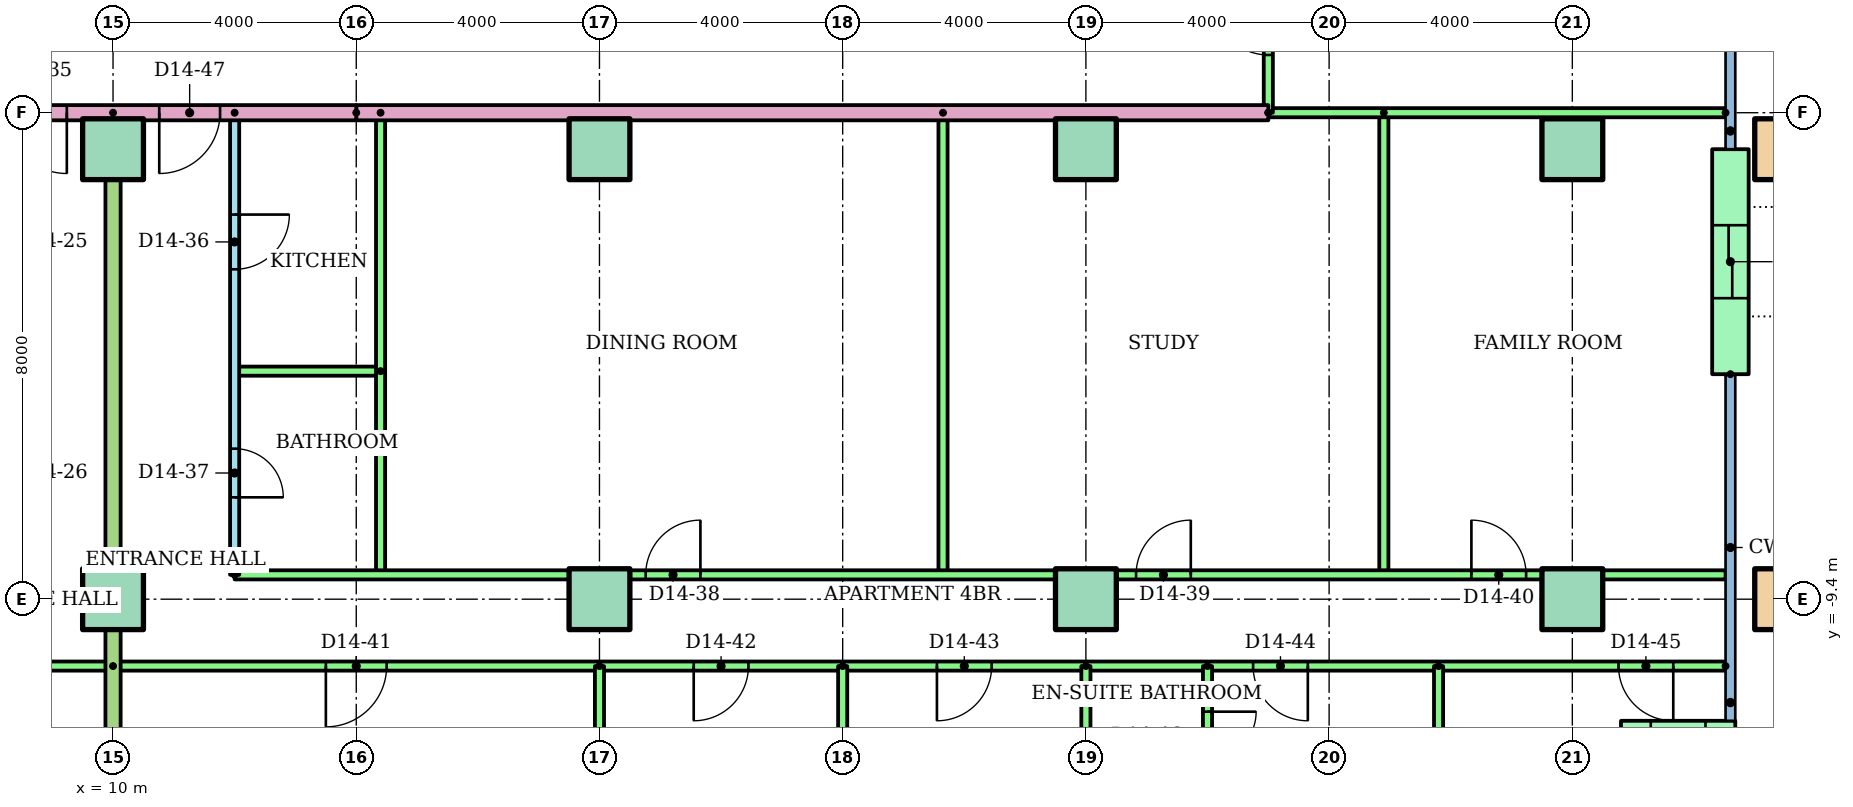
"""IFC4 building model, lengths in metres.
Left out: names, types, materials, properties, quantities, classifications, styles, units other than length and angle.
Written with IfcOpenShell. Run it as: python <this file> out.ifc"""

import sys

from ifc_helpers import new_model, si_unit, direction, frame, frame_2d, origin, origin_2d, place, context, subcontext, project, spatial, rectangle, hollow_rectangle, extrude, element, fill, save


model = new_model("IFC4")
c1 = context("Model", 3, precision=1e-05, world=origin(), true_north=direction((0.0, 1.0)))
c2 = subcontext(c1, "Body", "Model", "MODEL_VIEW")
j1 = project(units=[si_unit("LENGTHUNIT", "METRE"), si_unit("PLANEANGLEUNIT", "RADIAN")], contexts=[c1])
p1 = place(None, origin())
s1 = spatial("IfcSite", under=j1, at=p1, CompositionType="ELEMENT")
p2 = place(p1, origin())
s2 = spatial("IfcBuilding", under=s1, at=p2, CompositionType="ELEMENT")
p3 = place(p2, frame((0.0, 0.0, 54.4)))
s3 = spatial("IfcBuildingStorey", under=s2, at=p3, CompositionType="ELEMENT", Elevation=54.4)
for number, where in (
    (1, (10.0, -9.4, 0.0)),
    (2, (18.0, -9.4, 0.0)),
    (3, (26.0, -9.4, 0.0)),
    (4, (34.0, -9.4, 0.0)),
):
    element("IfcColumn", number, at=place(p3, frame(where)), inside=s3, PredefinedType="COLUMN", context=c2, shape_type="SweptSolid", body=[
        extrude(rectangle(XDim=1.0, YDim=1.0, at=origin_2d()), origin(), (0.0, 0.0, 1.0), 3.2),
    ])
p4 = place(p3, frame((37.5, -9.4, 0.0)))
e5 = element("IfcColumn", 5, at=p4, inside=s3, PredefinedType="COLUMN", context=c2, shape_type="SweptSolid", body=[
    extrude(hollow_rectangle(XDim=1.0, YDim=1.0, WallThickness=0.05, at=origin_2d()), origin(), (0.0, 0.0, 1.0), 3.2),
])
for number, where in (
    (6, (10.0, -2.0, 0.0)),
    (7, (18.0, -2.0, 0.0)),
    (8, (26.0, -2.0, 0.0)),
    (9, (34.0, -2.0, 0.0)),
):
    element("IfcColumn", number, at=place(p3, frame(where)), inside=s3, PredefinedType="COLUMN", context=c2, shape_type="SweptSolid", body=[
        extrude(rectangle(XDim=1.0, YDim=1.0, at=origin_2d()), origin(), (0.0, 0.0, 1.0), 3.2),
    ])
p5 = place(p3, frame((37.5, -2.0, 0.0)))
e10 = element("IfcColumn", 10, at=p5, inside=s3, PredefinedType="COLUMN", context=c2, shape_type="SweptSolid", body=[
    extrude(hollow_rectangle(XDim=1.0, YDim=1.0, WallThickness=0.05, at=origin_2d()), origin(), (0.0, 0.0, 1.0), 3.2),
])
p6 = place(p3, frame((34.8, -11.7, 0.0)))
e11 = element("IfcWall", 11, at=p6, inside=s3, PredefinedType="STANDARD", context=c2, shape_type="SweptSolid", body=[
    extrude(rectangle(XDim=1.88, YDim=0.6, at=frame_2d((0.94, 0.0))), origin(), (0.0, 0.0, 1.0), 2.92),
])
p7 = place(p6, frame((0.49, 0.0, 0.9)))
e12 = element("IfcOpeningElement", 12, at=p7, cuts=e11, PredefinedType="OPENING", context=c2, shape_type="SweptSolid", body=[
    extrude(rectangle(XDim=0.9, YDim=1.5, at=frame_2d((0.45, 0.75))), frame((0.0, 0.31, 0.0), z_axis=(0.0, -1.0, 0.0), x_axis=(1.0, 0.0, 0.0)), (0.0, 0.0, 1.0), 0.62),
])
p8 = place(p3, frame((36.6, -5.7, 0.0), z_axis=(0.0, 0.0, 1.0), x_axis=(0.0, 1.0, 0.0)))
e13 = element("IfcWall", 13, at=p8, inside=s3, PredefinedType="STANDARD", context=c2, shape_type="SweptSolid", body=[
    extrude(rectangle(XDim=3.7, YDim=0.6, at=frame_2d((1.85, 0.0))), origin(), (0.0, 0.0, 1.0), 2.92),
])
p9 = place(p8, frame((1.25, 0.0, 0.0)))
e14 = element("IfcOpeningElement", 14, at=p9, cuts=e13, PredefinedType="OPENING", context=c2, shape_type="SweptSolid", body=[
    extrude(rectangle(XDim=1.2, YDim=2.1, at=frame_2d((0.6, 1.05))), frame((0.0, 0.31, 0.0), z_axis=(0.0, -1.0, 0.0), x_axis=(1.0, 0.0, 0.0)), (0.0, 0.0, 1.0), 0.62),
])
p10 = place(p3, frame((10.0, -10.5, 0.0), z_axis=(0.0, 0.0, 1.0), x_axis=(-1.0, 0.0, 0.0)))
e15 = element("IfcWall", 15, at=p10, inside=s3, PredefinedType="PARTITIONING", context=c2, shape_type="SweptSolid", body=[
    extrude(rectangle(XDim=24.0, YDim=0.15, at=frame_2d((12.0, 0.0))), origin(), (0.0, 0.0, 1.0), 2.4),
])
p11 = place(p10, frame((19.5, 0.0, 0.0)))
e16 = element("IfcOpeningElement", 16, at=p11, cuts=e15, PredefinedType="OPENING", context=c2, shape_type="SweptSolid", body=[
    extrude(rectangle(XDim=1.0, YDim=2.1, at=frame_2d((0.5, 1.05))), frame((0.0, 0.085, 0.0), z_axis=(0.0, -1.0, 0.0), x_axis=(1.0, 0.0, 0.0)), (0.0, 0.0, 1.0), 0.17),
])
p12 = place(p10, frame((13.55, 0.0, 0.0)))
e17 = element("IfcOpeningElement", 17, at=p12, cuts=e15, PredefinedType="OPENING", context=c2, shape_type="SweptSolid", body=[
    extrude(rectangle(XDim=0.9, YDim=2.1, at=frame_2d((0.45, 1.05))), frame((0.0, 0.085, 0.0), z_axis=(0.0, -1.0, 0.0), x_axis=(1.0, 0.0, 0.0)), (0.0, 0.0, 1.0), 0.17),
])
p13 = place(p10, frame((9.55, 0.0, 0.0)))
e18 = element("IfcOpeningElement", 18, at=p13, cuts=e15, PredefinedType="OPENING", context=c2, shape_type="SweptSolid", body=[
    extrude(rectangle(XDim=0.9, YDim=2.1, at=frame_2d((0.45, 1.05))), frame((0.0, 0.085, 0.0), z_axis=(0.0, -1.0, 0.0), x_axis=(1.0, 0.0, 0.0)), (0.0, 0.0, 1.0), 0.17),
])
p14 = place(p10, frame((5.55, 0.0, 0.0)))
e19 = element("IfcOpeningElement", 19, at=p14, cuts=e15, PredefinedType="OPENING", context=c2, shape_type="SweptSolid", body=[
    extrude(rectangle(XDim=0.9, YDim=2.1, at=frame_2d((0.45, 1.05))), frame((0.0, 0.085, 0.0), z_axis=(0.0, -1.0, 0.0), x_axis=(1.0, 0.0, 0.0)), (0.0, 0.0, 1.0), 0.17),
])
p15 = place(p10, frame((1.55, 0.0, 0.0)))
e20 = element("IfcOpeningElement", 20, at=p15, cuts=e15, PredefinedType="OPENING", context=c2, shape_type="SweptSolid", body=[
    extrude(rectangle(XDim=0.9, YDim=2.1, at=frame_2d((0.45, 1.05))), frame((0.0, 0.085, 0.0), z_axis=(0.0, -1.0, 0.0), x_axis=(1.0, 0.0, 0.0)), (0.0, 0.0, 1.0), 0.17),
])
p16 = place(p3, frame((12.0, -1.4, 0.0), z_axis=(0.0, 0.0, 1.0), x_axis=(0.0, -1.0, 0.0)))
e21 = element("IfcWall", 21, at=p16, inside=s3, PredefinedType="PARTITIONING", context=c2, shape_type="SweptSolid", body=[
    extrude(rectangle(XDim=7.6, YDim=0.15, at=frame_2d((3.8, 0.0))), origin(), (0.0, 0.0, 1.0), 2.4),
])
p17 = place(p16, frame((1.675, 0.0, 0.0)))
e22 = element("IfcOpeningElement", 22, at=p17, cuts=e21, PredefinedType="OPENING", context=c2, shape_type="SweptSolid", body=[
    extrude(rectangle(XDim=0.9, YDim=2.1, at=frame_2d((0.45, 1.05))), frame((0.0, 0.085, 0.0), z_axis=(0.0, -1.0, 0.0), x_axis=(1.0, 0.0, 0.0)), (0.0, 0.0, 1.0), 0.17),
])
p18 = place(p16, frame((5.525, 0.0, 0.0)))
e23 = element("IfcOpeningElement", 23, at=p18, cuts=e21, PredefinedType="OPENING", context=c2, shape_type="SweptSolid", body=[
    extrude(rectangle(XDim=0.8, YDim=2.1, at=frame_2d((0.4, 1.05))), frame((0.0, 0.085, 0.0), z_axis=(0.0, -1.0, 0.0), x_axis=(1.0, 0.0, 0.0)), (0.0, 0.0, 1.0), 0.17),
])
p19 = place(p3, frame((14.4, -5.65, 0.0), z_axis=(0.0, 0.0, 1.0), x_axis=(-1.0, 0.0, 0.0)))
e24 = element("IfcWall", 24, at=p19, inside=s3, PredefinedType="PARTITIONING", context=c2, shape_type="SweptSolid", body=[
    extrude(rectangle(XDim=2.4, YDim=0.15, at=frame_2d((1.2, 0.0))), origin(), (0.0, 0.0, 1.0), 2.4),
])
for number, where, z_axis, x_axis in (
    (25, (14.4, -1.4, 0.0), (0.0, 0.0, 1.0), (0.0, -1.0, 0.0)),
    (26, (23.65, -1.4, 0.0), (0.0, 0.0, 1.0), (0.0, -1.0, 0.0)),
    (27, (30.9, -1.4, 0.0), (0.0, 0.0, 1.0), (0.0, -1.0, 0.0)),
):
    element("IfcWall", number, at=place(p3, frame(where, z_axis=z_axis, x_axis=x_axis)), inside=s3, PredefinedType="PARTITIONING", context=c2, shape_type="SweptSolid", body=[
        extrude(rectangle(XDim=7.6, YDim=0.15, at=frame_2d((3.8, 0.0))), origin(), (0.0, 0.0, 1.0), 2.4),
    ])
p20 = place(p3, frame((12.0, -9.0, 0.0)))
e28 = element("IfcWall", 28, at=p20, inside=s3, PredefinedType="PARTITIONING", context=c2, shape_type="SweptSolid", body=[
    extrude(rectangle(XDim=24.52, YDim=0.15, at=frame_2d((12.26, 0.0))), origin(), (0.0, 0.0, 1.0), 2.4),
])
p21 = place(p20, frame((6.76, 0.0, 0.0)))
e29 = element("IfcOpeningElement", 29, at=p21, cuts=e28, PredefinedType="OPENING", context=c2, shape_type="SweptSolid", body=[
    extrude(rectangle(XDim=0.9, YDim=2.1, at=frame_2d((0.45, 1.05))), frame((0.0, 0.085, 0.0), z_axis=(0.0, -1.0, 0.0), x_axis=(1.0, 0.0, 0.0)), (0.0, 0.0, 1.0), 0.17),
])
p22 = place(p20, frame((14.825, 0.0, 0.0)))
e30 = element("IfcOpeningElement", 30, at=p22, cuts=e28, PredefinedType="OPENING", context=c2, shape_type="SweptSolid", body=[
    extrude(rectangle(XDim=0.9, YDim=2.1, at=frame_2d((0.45, 1.05))), frame((0.0, 0.085, 0.0), z_axis=(0.0, -1.0, 0.0), x_axis=(1.0, 0.0, 0.0)), (0.0, 0.0, 1.0), 0.17),
])
p23 = place(p20, frame((20.34, 0.0, 0.0)))
e31 = element("IfcOpeningElement", 31, at=p23, cuts=e28, PredefinedType="OPENING", context=c2, shape_type="SweptSolid", body=[
    extrude(rectangle(XDim=0.9, YDim=2.1, at=frame_2d((0.45, 1.05))), frame((0.0, 0.085, 0.0), z_axis=(0.0, -1.0, 0.0), x_axis=(1.0, 0.0, 0.0)), (0.0, 0.0, 1.0), 0.17),
])
p24 = place(p3, frame((36.52, -10.5, 0.0), z_axis=(0.0, 0.0, 1.0), x_axis=(-1.0, 0.0, 0.0)))
e32 = element("IfcWall", 32, at=p24, inside=s3, PredefinedType="PARTITIONING", context=c2, shape_type="SweptSolid", body=[
    extrude(rectangle(XDim=26.52, YDim=0.15, at=frame_2d((13.26, 0.0))), origin(), (0.0, 0.0, 1.0), 2.4),
])
p25 = place(p24, frame((22.02, 0.0, 0.0)))
e33 = element("IfcOpeningElement", 33, at=p25, cuts=e32, PredefinedType="OPENING", context=c2, shape_type="SweptSolid", body=[
    extrude(rectangle(XDim=1.0, YDim=2.1, at=frame_2d((0.5, 1.05))), frame((0.0, 0.085, 0.0), z_axis=(0.0, -1.0, 0.0), x_axis=(1.0, 0.0, 0.0)), (0.0, 0.0, 1.0), 0.17),
])
p26 = place(p24, frame((16.07, 0.0, 0.0)))
e34 = element("IfcOpeningElement", 34, at=p26, cuts=e32, PredefinedType="OPENING", context=c2, shape_type="SweptSolid", body=[
    extrude(rectangle(XDim=0.9, YDim=2.1, at=frame_2d((0.45, 1.05))), frame((0.0, 0.085, 0.0), z_axis=(0.0, -1.0, 0.0), x_axis=(1.0, 0.0, 0.0)), (0.0, 0.0, 1.0), 0.17),
])
p27 = place(p24, frame((12.07, 0.0, 0.0)))
e35 = element("IfcOpeningElement", 35, at=p27, cuts=e32, PredefinedType="OPENING", context=c2, shape_type="SweptSolid", body=[
    extrude(rectangle(XDim=0.9, YDim=2.1, at=frame_2d((0.45, 1.05))), frame((0.0, 0.085, 0.0), z_axis=(0.0, -1.0, 0.0), x_axis=(1.0, 0.0, 0.0)), (0.0, 0.0, 1.0), 0.17),
])
p28 = place(p24, frame((6.87, 0.0, 0.0)))
e36 = element("IfcOpeningElement", 36, at=p28, cuts=e32, PredefinedType="OPENING", context=c2, shape_type="SweptSolid", body=[
    extrude(rectangle(XDim=0.9, YDim=2.1, at=frame_2d((0.45, 1.05))), frame((0.0, 0.085, 0.0), z_axis=(0.0, -1.0, 0.0), x_axis=(1.0, 0.0, 0.0)), (0.0, 0.0, 1.0), 0.17),
])
p29 = place(p24, frame((0.86, 0.0, 0.0)))
e37 = element("IfcOpeningElement", 37, at=p29, cuts=e32, PredefinedType="OPENING", context=c2, shape_type="SweptSolid", body=[
    extrude(rectangle(XDim=0.9, YDim=2.1, at=frame_2d((0.45, 1.05))), frame((0.0, 0.085, 0.0), z_axis=(0.0, -1.0, 0.0), x_axis=(1.0, 0.0, 0.0)), (0.0, 0.0, 1.0), 0.17),
])
p30 = place(p3, frame((18.0, -10.5, 0.0), z_axis=(0.0, 0.0, 1.0), x_axis=(0.0, -1.0, 0.0)))
e38 = element("IfcWall", 38, at=p30, inside=s3, PredefinedType="PARTITIONING", context=c2, shape_type="SweptSolid", body=[
    extrude(rectangle(XDim=5.61, YDim=0.15, at=frame_2d((2.805, 0.0))), origin(), (0.0, 0.0, 1.0), 2.4),
])
p31 = place(p3, frame((22.0, -10.5, 0.0), z_axis=(0.0, 0.0, 1.0), x_axis=(0.0, -1.0, 0.0)))
e39 = element("IfcWall", 39, at=p31, inside=s3, PredefinedType="PARTITIONING", context=c2, shape_type="SweptSolid", body=[
    extrude(rectangle(XDim=5.621, YDim=0.15, at=frame_2d((2.811, 0.0))), origin(), (0.0, 0.0, 1.0), 2.4),
])
p32 = place(p3, frame((26.0, -10.5, 0.0), z_axis=(0.0, 0.0, 1.0), x_axis=(0.0, -1.0, 0.0)))
e40 = element("IfcWall", 40, at=p32, inside=s3, PredefinedType="PARTITIONING", context=c2, shape_type="SweptSolid", body=[
    extrude(rectangle(XDim=5.61, YDim=0.15, at=frame_2d((2.805, 0.0))), origin(), (0.0, 0.0, 1.0), 2.4),
])
p33 = place(p3, frame((31.8, -10.5, 0.0), z_axis=(0.0, 0.0, 1.0), x_axis=(0.0, -1.0, 0.0)))
e41 = element("IfcWall", 41, at=p33, inside=s3, PredefinedType="PARTITIONING", context=c2, shape_type="SweptSolid", body=[
    extrude(rectangle(XDim=3.82, YDim=0.15, at=frame_2d((1.91, 0.0))), origin(), (0.0, 0.0, 1.0), 2.4),
])
p34 = place(p3, frame((28.0, -10.5, 0.0), z_axis=(0.0, 0.0, 1.0), x_axis=(0.0, -1.0, 0.0)))
e42 = element("IfcWall", 42, at=p34, inside=s3, PredefinedType="PARTITIONING", context=c2, shape_type="SweptSolid", body=[
    extrude(rectangle(XDim=2.3, YDim=0.15, at=frame_2d((1.15, 0.0))), origin(), (0.0, 0.0, 1.0), 2.4),
])
p35 = place(p34, frame((0.75, 0.0, 0.0)))
e43 = element("IfcOpeningElement", 43, at=p35, cuts=e42, PredefinedType="OPENING", context=c2, shape_type="SweptSolid", body=[
    extrude(rectangle(XDim=0.8, YDim=2.1, at=frame_2d((0.4, 1.05))), frame((0.0, 0.085, 0.0), z_axis=(0.0, -1.0, 0.0), x_axis=(1.0, 0.0, 0.0)), (0.0, 0.0, 1.0), 0.17),
])
p36 = place(p3, frame((10.0, -1.4, 0.0), z_axis=(0.0, 0.0, 1.0), x_axis=(0.0, -1.0, 0.0)))
e44 = element("IfcWall", 44, at=p36, inside=s3, PredefinedType="PARTITIONING", context=c2, shape_type="SweptSolid", body=[
    extrude(rectangle(XDim=14.71, YDim=0.25, at=frame_2d((7.355, 0.0))), origin(), (0.0, 0.0, 1.0), 2.4),
])
p37 = place(p3, frame((29.0, -1.4, 0.0), z_axis=(0.0, 0.0, 1.0), x_axis=(-1.0, 0.0, 0.0)))
e45 = element("IfcWall", 45, at=p37, inside=s3, PredefinedType="PARTITIONING", context=c2, shape_type="SweptSolid", body=[
    extrude(rectangle(XDim=15.0, YDim=0.25, at=frame_2d((7.5, 0.0))), origin(), (0.0, 0.0, 1.0), 2.4),
])
p38 = place(p3, frame((36.52, -1.4, 0.0), z_axis=(0.0, 0.0, 1.0), x_axis=(-1.0, 0.0, 0.0)))
e46 = element("IfcWall", 46, at=p38, inside=s3, PredefinedType="PARTITIONING", context=c2, shape_type="SweptSolid", body=[
    extrude(rectangle(XDim=7.52, YDim=0.15, at=frame_2d((3.76, 0.0))), origin(), (0.0, 0.0, 1.0), 2.4),
])
p39 = place(p3, frame((29.0, -1.4, 0.0), z_axis=(0.0, 0.0, 1.0), x_axis=(0.0, 1.0, 0.0)))
e47 = element("IfcWall", 47, at=p39, inside=s3, PredefinedType="PARTITIONING", context=c2, shape_type="SweptSolid", body=[
    extrude(rectangle(XDim=2.8, YDim=0.15, at=frame_2d((1.4, 0.0))), origin(), (0.0, 0.0, 1.0), 2.4),
])
p40 = place(p39, frame((0.95, 0.0, 0.0)))
e48 = element("IfcOpeningElement", 48, at=p40, cuts=e47, PredefinedType="OPENING", context=c2, shape_type="SweptSolid", body=[
    extrude(rectangle(XDim=0.9, YDim=2.1, at=frame_2d((0.45, 1.05))), frame((0.0, 0.085, 0.0), z_axis=(0.0, -1.0, 0.0), x_axis=(1.0, 0.0, 0.0)), (0.0, 0.0, 1.0), 0.17),
])
p41 = place(p3, frame((14.0, -1.4, 0.0), z_axis=(0.0, 0.0, 1.0), x_axis=(-1.0, 0.0, 0.0)))
e49 = element("IfcWall", 49, at=p41, inside=s3, PredefinedType="PARTITIONING", context=c2, shape_type="SweptSolid", body=[
    extrude(rectangle(XDim=28.0, YDim=0.25, at=frame_2d((14.0, 0.0))), origin(), (0.0, 0.0, 1.0), 2.4),
])
p42 = place(p41, frame((4.76, 0.0, 0.0)))
e50 = element("IfcOpeningElement", 50, at=p42, cuts=e49, PredefinedType="OPENING", context=c2, shape_type="SweptSolid", body=[
    extrude(rectangle(XDim=1.0, YDim=2.1, at=frame_2d((0.5, 1.05))), frame((0.0, 0.135, 0.0), z_axis=(0.0, -1.0, 0.0), x_axis=(1.0, 0.0, 0.0)), (0.0, 0.0, 1.0), 0.27),
])
p43 = place(p41, frame((2.24, 0.0, 0.0)))
e51 = element("IfcOpeningElement", 51, at=p43, cuts=e49, PredefinedType="OPENING", context=c2, shape_type="SweptSolid", body=[
    extrude(rectangle(XDim=1.0, YDim=2.1, at=frame_2d((0.5, 1.05))), frame((0.0, 0.135, 0.0), z_axis=(0.0, -1.0, 0.0), x_axis=(1.0, 0.0, 0.0)), (0.0, 0.0, 1.0), 0.27),
])
p44 = place(p42, origin())
e52 = element("IfcDoor", 52, at=p44, inside=s3, OperationType="SINGLE_SWING_LEFT", PredefinedType="DOOR", context=c2, shape_type="SweptSolid", body=[
    extrude(rectangle(XDim=1.0, YDim=2.1, at=frame_2d((0.5, 1.05))), frame((0.0, 0.025, 0.0), z_axis=(0.0, -1.0, 0.0), x_axis=(1.0, 0.0, 0.0)), (0.0, 0.0, 1.0), 0.05),
])
fill(e50, e52)
p45 = place(p17, origin())
e53 = element("IfcDoor", 53, at=p45, inside=s3, OperationType="SINGLE_SWING_LEFT", PredefinedType="DOOR", context=c2, shape_type="SweptSolid", body=[
    extrude(rectangle(XDim=0.9, YDim=2.1, at=frame_2d((0.45, 1.05))), frame((0.0, 0.025, 0.0), z_axis=(0.0, -1.0, 0.0), x_axis=(1.0, 0.0, 0.0)), (0.0, 0.0, 1.0), 0.05),
])
fill(e22, e53)
p46 = place(p18, origin())
e54 = element("IfcDoor", 54, at=p46, inside=s3, OperationType="SINGLE_SWING_RIGHT", PredefinedType="DOOR", context=c2, shape_type="SweptSolid", body=[
    extrude(rectangle(XDim=0.8, YDim=2.1, at=frame_2d((0.4, 1.05))), frame((0.0, 0.025, 0.0), z_axis=(0.0, -1.0, 0.0), x_axis=(1.0, 0.0, 0.0)), (0.0, 0.0, 1.0), 0.05),
])
fill(e23, e54)
p47 = place(p21, origin())
e55 = element("IfcDoor", 55, at=p47, inside=s3, OperationType="SINGLE_SWING_RIGHT", PredefinedType="DOOR", context=c2, shape_type="SweptSolid", body=[
    extrude(rectangle(XDim=0.9, YDim=2.1, at=frame_2d((0.45, 1.05))), frame((0.0, 0.025, 0.0), z_axis=(0.0, -1.0, 0.0), x_axis=(1.0, 0.0, 0.0)), (0.0, 0.0, 1.0), 0.05),
])
fill(e29, e55)
p48 = place(p22, origin())
e56 = element("IfcDoor", 56, at=p48, inside=s3, OperationType="SINGLE_SWING_RIGHT", PredefinedType="DOOR", context=c2, shape_type="SweptSolid", body=[
    extrude(rectangle(XDim=0.9, YDim=2.1, at=frame_2d((0.45, 1.05))), frame((0.0, 0.025, 0.0), z_axis=(0.0, -1.0, 0.0), x_axis=(1.0, 0.0, 0.0)), (0.0, 0.0, 1.0), 0.05),
])
fill(e30, e56)
p49 = place(p23, origin())
e57 = element("IfcDoor", 57, at=p49, inside=s3, OperationType="SINGLE_SWING_LEFT", PredefinedType="DOOR", context=c2, shape_type="SweptSolid", body=[
    extrude(rectangle(XDim=0.9, YDim=2.1, at=frame_2d((0.45, 1.05))), frame((0.0, 0.025, 0.0), z_axis=(0.0, -1.0, 0.0), x_axis=(1.0, 0.0, 0.0)), (0.0, 0.0, 1.0), 0.05),
])
fill(e31, e57)
p50 = place(p25, origin())
e58 = element("IfcDoor", 58, at=p50, inside=s3, OperationType="SINGLE_SWING_RIGHT", PredefinedType="DOOR", context=c2, shape_type="SweptSolid", body=[
    extrude(rectangle(XDim=1.0, YDim=2.1, at=frame_2d((0.5, 1.05))), frame((0.0, 0.025, 0.0), z_axis=(0.0, -1.0, 0.0), x_axis=(1.0, 0.0, 0.0)), (0.0, 0.0, 1.0), 0.05),
])
fill(e33, e58)
p51 = place(p26, origin())
e59 = element("IfcDoor", 59, at=p51, inside=s3, OperationType="SINGLE_SWING_RIGHT", PredefinedType="DOOR", context=c2, shape_type="SweptSolid", body=[
    extrude(rectangle(XDim=0.9, YDim=2.1, at=frame_2d((0.45, 1.05))), frame((0.0, 0.025, 0.0), z_axis=(0.0, -1.0, 0.0), x_axis=(1.0, 0.0, 0.0)), (0.0, 0.0, 1.0), 0.05),
])
fill(e34, e59)
p52 = place(p27, origin())
e60 = element("IfcDoor", 60, at=p52, inside=s3, OperationType="SINGLE_SWING_RIGHT", PredefinedType="DOOR", context=c2, shape_type="SweptSolid", body=[
    extrude(rectangle(XDim=0.9, YDim=2.1, at=frame_2d((0.45, 1.05))), frame((0.0, 0.025, 0.0), z_axis=(0.0, -1.0, 0.0), x_axis=(1.0, 0.0, 0.0)), (0.0, 0.0, 1.0), 0.05),
])
fill(e35, e60)
p53 = place(p28, origin())
e61 = element("IfcDoor", 61, at=p53, inside=s3, OperationType="SINGLE_SWING_LEFT", PredefinedType="DOOR", context=c2, shape_type="SweptSolid", body=[
    extrude(rectangle(XDim=0.9, YDim=2.1, at=frame_2d((0.45, 1.05))), frame((0.0, 0.025, 0.0), z_axis=(0.0, -1.0, 0.0), x_axis=(1.0, 0.0, 0.0)), (0.0, 0.0, 1.0), 0.05),
])
fill(e36, e61)
p54 = place(p29, origin())
e62 = element("IfcDoor", 62, at=p54, inside=s3, OperationType="SINGLE_SWING_LEFT", PredefinedType="DOOR", context=c2, shape_type="SweptSolid", body=[
    extrude(rectangle(XDim=0.9, YDim=2.1, at=frame_2d((0.45, 1.05))), frame((0.0, 0.025, 0.0), z_axis=(0.0, -1.0, 0.0), x_axis=(1.0, 0.0, 0.0)), (0.0, 0.0, 1.0), 0.05),
])
fill(e37, e62)
p55 = place(p35, origin())
e63 = element("IfcDoor", 63, at=p55, inside=s3, OperationType="SINGLE_SWING_LEFT", PredefinedType="DOOR", context=c2, shape_type="SweptSolid", body=[
    extrude(rectangle(XDim=0.8, YDim=2.1, at=frame_2d((0.4, 1.05))), frame((0.0, 0.025, 0.0), z_axis=(0.0, -1.0, 0.0), x_axis=(1.0, 0.0, 0.0)), (0.0, 0.0, 1.0), 0.05),
])
fill(e43, e63)
p56 = place(p43, origin())
e64 = element("IfcDoor", 64, at=p56, inside=s3, OperationType="SINGLE_SWING_RIGHT", PredefinedType="DOOR", context=c2, shape_type="SweptSolid", body=[
    extrude(rectangle(XDim=1.0, YDim=2.1, at=frame_2d((0.5, 1.05))), frame((0.0, 0.025, 0.0), z_axis=(0.0, -1.0, 0.0), x_axis=(1.0, 0.0, 0.0)), (0.0, 0.0, 1.0), 0.05),
])
fill(e51, e64)
p57 = place(p40, origin())
e65 = element("IfcDoor", 65, at=p57, inside=s3, OperationType="SINGLE_SWING_RIGHT", PredefinedType="DOOR", context=c2, shape_type="SweptSolid", body=[
    extrude(rectangle(XDim=0.9, YDim=2.1, at=frame_2d((0.45, 1.05))), frame((0.0, 0.025, 0.0), z_axis=(0.0, -1.0, 0.0), x_axis=(1.0, 0.0, 0.0)), (0.0, 0.0, 1.0), 0.05),
])
fill(e48, e65)
p58 = place(p9, origin())
e66 = element("IfcDoor", 66, at=p58, inside=s3, OperationType="SLIDING_TO_LEFT", PredefinedType="DOOR", context=c2, shape_type="SweptSolid", body=[
    extrude(rectangle(XDim=1.2, YDim=2.1, at=frame_2d((0.6, 1.05))), frame((0.0, 0.025, 0.0), z_axis=(0.0, -1.0, 0.0), x_axis=(1.0, 0.0, 0.0)), (0.0, 0.0, 1.0), 0.05),
])
fill(e14, e66)
save(model, sys.argv[1])
